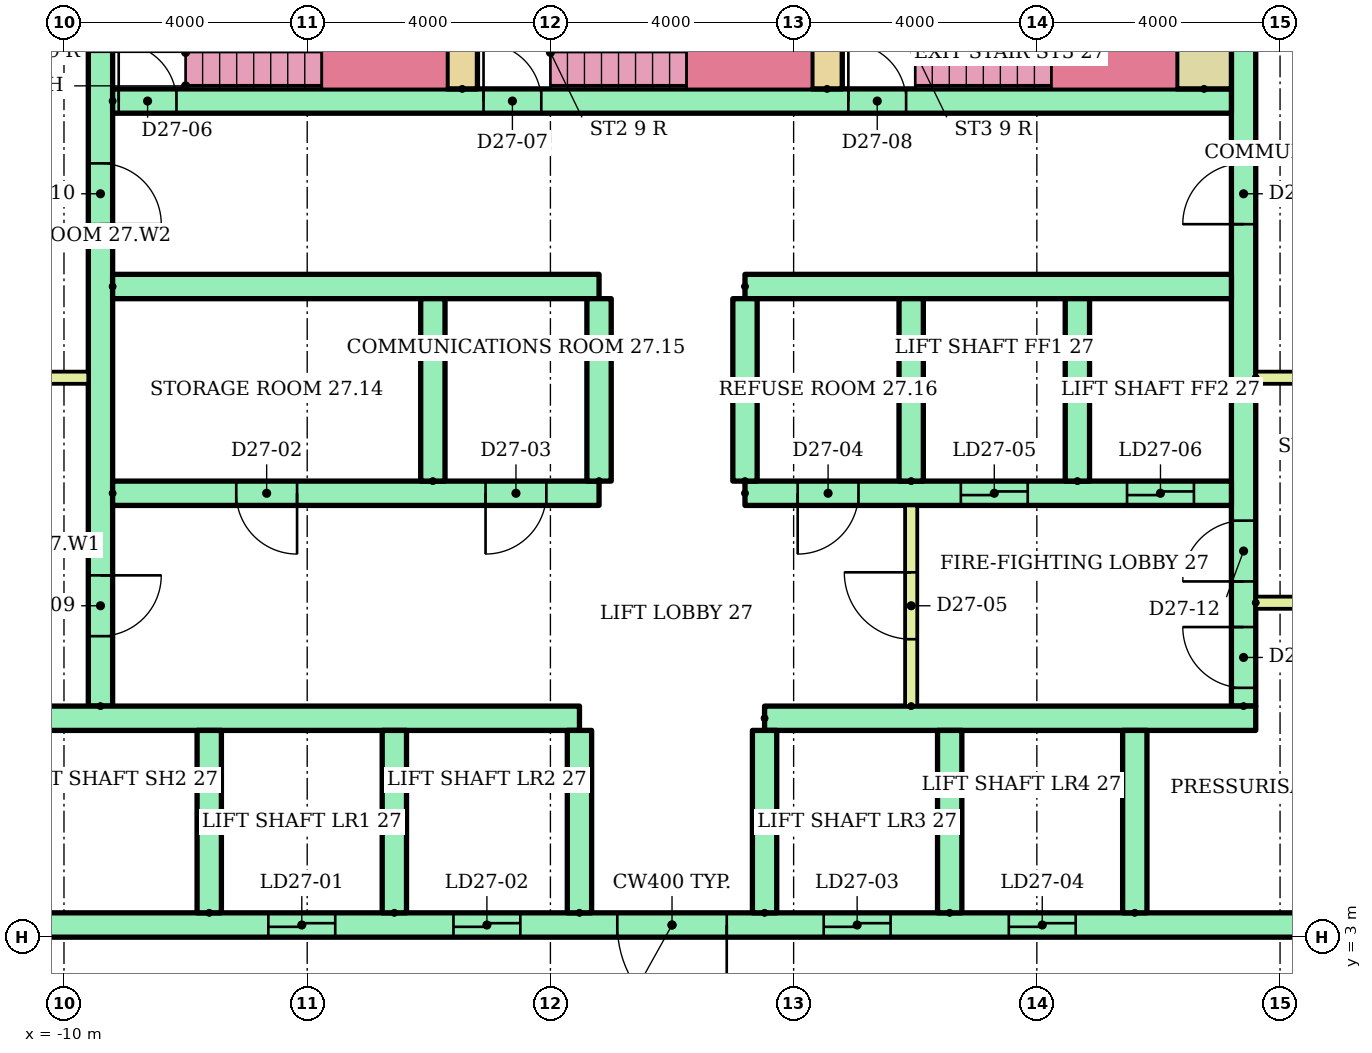
"""IFC4 building model, lengths in metres.
Left out: names, types, materials, properties, quantities, classifications, styles, units other than length and angle.
Written with IfcOpenShell. Run it as: python <this file> out.ifc"""

import sys

from ifc_helpers import new_model, si_unit, direction, frame, frame_2d, origin, place, context, subcontext, project, spatial, rectangle, extrude, element, fill, save


model = new_model("IFC4")
c1 = context("Model", 3, precision=1e-05, world=origin(), true_north=direction((0.0, 1.0)))
c2 = subcontext(c1, "Body", "Model", "MODEL_VIEW")
j1 = project(units=[si_unit("LENGTHUNIT", "METRE"), si_unit("PLANEANGLEUNIT", "RADIAN")], contexts=[c1])
p1 = place(None, origin())
s1 = spatial("IfcSite", under=j1, at=p1, CompositionType="ELEMENT")
p2 = place(p1, origin())
s2 = spatial("IfcBuilding", under=s1, at=p2, CompositionType="ELEMENT")
p3 = place(p2, frame((0.0, 0.0, 103.1)))
s3 = spatial("IfcBuildingStorey", under=s2, at=p3, CompositionType="ELEMENT", Elevation=103.1)
p4 = place(p3, frame((-9.4, 6.8, 0.0), z_axis=(0.0, 0.0, 1.0), x_axis=(0.0, 1.0, 0.0)))
e1 = element("IfcWall", 1, at=p4, inside=s3, PredefinedType="SHEAR", context=c2, shape_type="SweptSolid", body=[
    extrude(rectangle(XDim=12.7, YDim=0.4, at=frame_2d((6.35, 0.0))), origin(), (0.0, 0.0, 1.0), 2.8),
])
p5 = place(p4, frame((1.15, 0.0, 0.0)))
e2 = element("IfcOpeningElement", 2, at=p5, cuts=e1, PredefinedType="OPENING", context=c2, shape_type="SweptSolid", body=[
    extrude(rectangle(XDim=1.0, YDim=2.1, at=frame_2d((0.5, 1.05))), frame((0.0, 0.21, 0.0), z_axis=(0.0, -1.0, 0.0), x_axis=(1.0, 0.0, 0.0)), (0.0, 0.0, 1.0), 0.42),
])
p6 = place(p4, frame((7.925, 0.0, 0.0)))
e3 = element("IfcOpeningElement", 3, at=p6, cuts=e1, PredefinedType="OPENING", context=c2, shape_type="SweptSolid", body=[
    extrude(rectangle(XDim=1.0, YDim=2.1, at=frame_2d((0.5, 1.05))), frame((0.0, 0.21, 0.0), z_axis=(0.0, -1.0, 0.0), x_axis=(1.0, 0.0, 0.0)), (0.0, 0.0, 1.0), 0.42),
])
p7 = place(p3, frame((9.4, 6.8, 0.0), z_axis=(0.0, 0.0, 1.0), x_axis=(0.0, 1.0, 0.0)))
e4 = element("IfcWall", 4, at=p7, inside=s3, PredefinedType="SHEAR", context=c2, shape_type="SweptSolid", body=[
    extrude(rectangle(XDim=12.7, YDim=0.4, at=frame_2d((6.35, 0.0))), origin(), (0.0, 0.0, 1.0), 2.8),
])
p8 = place(p7, frame((0.3, 0.0, 0.0)))
e5 = element("IfcOpeningElement", 5, at=p8, cuts=e4, PredefinedType="OPENING", context=c2, shape_type="SweptSolid", body=[
    extrude(rectangle(XDim=1.0, YDim=2.1, at=frame_2d((0.5, 1.05))), frame((0.0, 0.21, 0.0), z_axis=(0.0, -1.0, 0.0), x_axis=(1.0, 0.0, 0.0)), (0.0, 0.0, 1.0), 0.42),
])
p9 = place(p7, frame((2.05, 0.0, 0.0)))
e6 = element("IfcOpeningElement", 6, at=p9, cuts=e4, PredefinedType="OPENING", context=c2, shape_type="SweptSolid", body=[
    extrude(rectangle(XDim=1.0, YDim=2.1, at=frame_2d((0.5, 1.05))), frame((0.0, 0.21, 0.0), z_axis=(0.0, -1.0, 0.0), x_axis=(1.0, 0.0, 0.0)), (0.0, 0.0, 1.0), 0.42),
])
p10 = place(p7, frame((7.925, 0.0, 0.0)))
e7 = element("IfcOpeningElement", 7, at=p10, cuts=e4, PredefinedType="OPENING", context=c2, shape_type="SweptSolid", body=[
    extrude(rectangle(XDim=1.0, YDim=2.1, at=frame_2d((0.5, 1.05))), frame((0.0, 0.21, 0.0), z_axis=(0.0, -1.0, 0.0), x_axis=(1.0, 0.0, 0.0)), (0.0, 0.0, 1.0), 0.42),
])
p11 = place(p3, frame((-13.5, 3.2, 0.0)))
e8 = element("IfcWall", 8, at=p11, inside=s3, PredefinedType="SHEAR", context=c2, shape_type="SweptSolid", body=[
    extrude(rectangle(XDim=27.0, YDim=0.4, at=frame_2d((13.5, 0.0))), origin(), (0.0, 0.0, 1.0), 2.8),
])
p12 = place(p11, frame((6.861, 0.0, 0.0)))
e9 = element("IfcOpeningElement", 9, at=p12, cuts=e8, PredefinedType="OPENING", context=c2, shape_type="SweptSolid", body=[
    extrude(rectangle(XDim=1.1, YDim=2.1, at=frame_2d((0.55, 1.05))), frame((0.0, 0.21, 0.0), z_axis=(0.0, -1.0, 0.0), x_axis=(1.0, 0.0, 0.0)), (0.0, 0.0, 1.0), 0.42),
])
p13 = place(p11, frame((9.906, 0.0, 0.0)))
e10 = element("IfcOpeningElement", 10, at=p13, cuts=e8, PredefinedType="OPENING", context=c2, shape_type="SweptSolid", body=[
    extrude(rectangle(XDim=1.1, YDim=2.1, at=frame_2d((0.55, 1.05))), frame((0.0, 0.21, 0.0), z_axis=(0.0, -1.0, 0.0), x_axis=(1.0, 0.0, 0.0)), (0.0, 0.0, 1.0), 0.42),
])
p14 = place(p11, frame((15.994, 0.0, 0.0)))
e11 = element("IfcOpeningElement", 11, at=p14, cuts=e8, PredefinedType="OPENING", context=c2, shape_type="SweptSolid", body=[
    extrude(rectangle(XDim=1.1, YDim=2.1, at=frame_2d((0.55, 1.05))), frame((0.0, 0.21, 0.0), z_axis=(0.0, -1.0, 0.0), x_axis=(1.0, 0.0, 0.0)), (0.0, 0.0, 1.0), 0.42),
])
p15 = place(p11, frame((19.039, 0.0, 0.0)))
e12 = element("IfcOpeningElement", 12, at=p15, cuts=e8, PredefinedType="OPENING", context=c2, shape_type="SweptSolid", body=[
    extrude(rectangle(XDim=1.1, YDim=2.1, at=frame_2d((0.55, 1.05))), frame((0.0, 0.21, 0.0), z_axis=(0.0, -1.0, 0.0), x_axis=(1.0, 0.0, 0.0)), (0.0, 0.0, 1.0), 0.42),
])
p16 = place(p11, frame((12.6, 0.0, 0.0)))
e13 = element("IfcOpeningElement", 13, at=p16, cuts=e8, PredefinedType="OPENING", context=c2, shape_type="SweptSolid", body=[
    extrude(rectangle(XDim=1.8, YDim=2.1, at=frame_2d((0.9, 1.05))), frame((0.0, 0.21, 0.0), z_axis=(0.0, -1.0, 0.0), x_axis=(1.0, 0.0, 0.0)), (0.0, 0.0, 1.0), 0.42),
])
p17 = place(p3, frame((-13.5, 6.6, 0.0)))
e14 = element("IfcWall", 14, at=p17, inside=s3, PredefinedType="SHEAR", context=c2, shape_type="SweptSolid", body=[
    extrude(rectangle(XDim=11.978, YDim=0.4, at=frame_2d((5.989, 0.0))), origin(), (0.0, 0.0, 1.0), 2.8),
])
p18 = place(p3, frame((1.522, 6.6, 0.0)))
e15 = element("IfcWall", 15, at=p18, inside=s3, PredefinedType="SHEAR", context=c2, shape_type="SweptSolid", body=[
    extrude(rectangle(XDim=8.078, YDim=0.4, at=frame_2d((4.039, 0.0))), origin(), (0.0, 0.0, 1.0), 2.8),
])
for number, where, z_axis, x_axis in (
    (16, (-7.611, 3.4, 0.0), (0.0, 0.0, 1.0), (0.0, 1.0, 0.0)),
    (17, (-4.567, 3.4, 0.0), (0.0, 0.0, 1.0), (0.0, 1.0, 0.0)),
    (18, (-1.522, 3.4, 0.0), (0.0, 0.0, 1.0), (0.0, 1.0, 0.0)),
    (19, (1.522, 3.4, 0.0), (0.0, 0.0, 1.0), (0.0, 1.0, 0.0)),
    (20, (4.567, 3.4, 0.0), (0.0, 0.0, 1.0), (0.0, 1.0, 0.0)),
    (21, (7.611, 3.4, 0.0), (0.0, 0.0, 1.0), (0.0, 1.0, 0.0)),
):
    element("IfcWall", number, at=place(p3, frame(where, z_axis=z_axis, x_axis=x_axis)), inside=s3, PredefinedType="SHEAR", context=c2, shape_type="SweptSolid", body=[
        extrude(rectangle(XDim=3.0, YDim=0.4, at=frame_2d((1.5, 0.0))), origin(), (0.0, 0.0, 1.0), 2.8),
    ])
p19 = place(p3, frame((-9.2, 10.3, 0.0)))
e22 = element("IfcWall", 22, at=p19, inside=s3, PredefinedType="SHEAR", context=c2, shape_type="SweptSolid", body=[
    extrude(rectangle(XDim=8.0, YDim=0.4, at=frame_2d((4.0, 0.0))), origin(), (0.0, 0.0, 1.0), 2.8),
])
p20 = place(p19, frame((2.033, 0.0, 0.0)))
e23 = element("IfcOpeningElement", 23, at=p20, cuts=e22, PredefinedType="OPENING", context=c2, shape_type="SweptSolid", body=[
    extrude(rectangle(XDim=1.0, YDim=2.1, at=frame_2d((0.5, 1.05))), frame((0.0, 0.21, 0.0), z_axis=(0.0, -1.0, 0.0), x_axis=(1.0, 0.0, 0.0)), (0.0, 0.0, 1.0), 0.42),
])
p21 = place(p19, frame((6.133, 0.0, 0.0)))
e24 = element("IfcOpeningElement", 24, at=p21, cuts=e22, PredefinedType="OPENING", context=c2, shape_type="SweptSolid", body=[
    extrude(rectangle(XDim=1.0, YDim=2.1, at=frame_2d((0.5, 1.05))), frame((0.0, 0.21, 0.0), z_axis=(0.0, -1.0, 0.0), x_axis=(1.0, 0.0, 0.0)), (0.0, 0.0, 1.0), 0.42),
])
p22 = place(p3, frame((-9.2, 13.7, 0.0)))
e25 = element("IfcWall", 25, at=p22, inside=s3, PredefinedType="SHEAR", context=c2, shape_type="SweptSolid", body=[
    extrude(rectangle(XDim=8.0, YDim=0.4, at=frame_2d((4.0, 0.0))), origin(), (0.0, 0.0, 1.0), 2.8),
])
p23 = place(p3, frame((1.2, 10.3, 0.0)))
e26 = element("IfcWall", 26, at=p23, inside=s3, PredefinedType="SHEAR", context=c2, shape_type="SweptSolid", body=[
    extrude(rectangle(XDim=8.0, YDim=0.4, at=frame_2d((4.0, 0.0))), origin(), (0.0, 0.0, 1.0), 2.8),
])
p24 = place(p23, frame((3.55, 0.0, 0.0)))
e27 = element("IfcOpeningElement", 27, at=p24, cuts=e26, PredefinedType="OPENING", context=c2, shape_type="SweptSolid", body=[
    extrude(rectangle(XDim=1.1, YDim=2.1, at=frame_2d((0.55, 1.05))), frame((0.0, 0.21, 0.0), z_axis=(0.0, -1.0, 0.0), x_axis=(1.0, 0.0, 0.0)), (0.0, 0.0, 1.0), 0.42),
])
p25 = place(p23, frame((6.283, 0.0, 0.0)))
e28 = element("IfcOpeningElement", 28, at=p25, cuts=e26, PredefinedType="OPENING", context=c2, shape_type="SweptSolid", body=[
    extrude(rectangle(XDim=1.1, YDim=2.1, at=frame_2d((0.55, 1.05))), frame((0.0, 0.21, 0.0), z_axis=(0.0, -1.0, 0.0), x_axis=(1.0, 0.0, 0.0)), (0.0, 0.0, 1.0), 0.42),
])
p26 = place(p23, frame((0.867, 0.0, 0.0)))
e29 = element("IfcOpeningElement", 29, at=p26, cuts=e26, PredefinedType="OPENING", context=c2, shape_type="SweptSolid", body=[
    extrude(rectangle(XDim=1.0, YDim=2.1, at=frame_2d((0.5, 1.05))), frame((0.0, 0.21, 0.0), z_axis=(0.0, -1.0, 0.0), x_axis=(1.0, 0.0, 0.0)), (0.0, 0.0, 1.0), 0.42),
])
p27 = place(p3, frame((1.2, 13.7, 0.0)))
e30 = element("IfcWall", 30, at=p27, inside=s3, PredefinedType="SHEAR", context=c2, shape_type="SweptSolid", body=[
    extrude(rectangle(XDim=8.0, YDim=0.4, at=frame_2d((4.0, 0.0))), origin(), (0.0, 0.0, 1.0), 2.8),
])
for number, where, z_axis, x_axis in (
    (31, (-3.933, 10.5, 0.0), (0.0, 0.0, 1.0), (0.0, 1.0, 0.0)),
    (32, (-1.2, 10.5, 0.0), (0.0, 0.0, 1.0), (0.0, 1.0, 0.0)),
    (33, (1.2, 10.5, 0.0), (0.0, 0.0, 1.0), (0.0, 1.0, 0.0)),
    (34, (3.933, 10.5, 0.0), (0.0, 0.0, 1.0), (0.0, 1.0, 0.0)),
    (35, (6.667, 10.5, 0.0), (0.0, 0.0, 1.0), (0.0, 1.0, 0.0)),
):
    element("IfcWall", number, at=place(p3, frame(where, z_axis=z_axis, x_axis=x_axis)), inside=s3, PredefinedType="SHEAR", context=c2, shape_type="SweptSolid", body=[
        extrude(rectangle(XDim=3.0, YDim=0.4, at=frame_2d((1.5, 0.0))), origin(), (0.0, 0.0, 1.0), 2.8),
    ])
p28 = place(p3, frame((3.933, 6.8, 0.0), z_axis=(0.0, 0.0, 1.0), x_axis=(0.0, 1.0, 0.0)))
e36 = element("IfcWall", 36, at=p28, inside=s3, PredefinedType="PARTITIONING", context=c2, shape_type="SweptSolid", body=[
    extrude(rectangle(XDim=3.3, YDim=0.2, at=frame_2d((1.65, 0.0))), origin(), (0.0, 0.0, 1.0), 2.8),
])
p29 = place(p28, frame((1.1, 0.0, 0.0)))
e37 = element("IfcOpeningElement", 37, at=p29, cuts=e36, PredefinedType="OPENING", context=c2, shape_type="SweptSolid", body=[
    extrude(rectangle(XDim=1.1, YDim=2.1, at=frame_2d((0.55, 1.05))), frame((0.0, 0.11, 0.0), z_axis=(0.0, -1.0, 0.0), x_axis=(1.0, 0.0, 0.0)), (0.0, 0.0, 1.0), 0.22),
])
p30 = place(p3, frame((-9.2, 16.75, 0.0)))
e38 = element("IfcWall", 38, at=p30, inside=s3, PredefinedType="SHEAR", context=c2, shape_type="SweptSolid", body=[
    extrude(rectangle(XDim=18.4, YDim=0.4, at=frame_2d((9.2, 0.0))), origin(), (0.0, 0.0, 1.0), 2.8),
])
p31 = place(p30, frame((0.1, 0.0, 0.0)))
e39 = element("IfcOpeningElement", 39, at=p31, cuts=e38, PredefinedType="OPENING", context=c2, shape_type="SweptSolid", body=[
    extrude(rectangle(XDim=0.95, YDim=2.1, at=frame_2d((0.475, 1.05))), frame((0.0, 0.21, 0.0), z_axis=(0.0, -1.0, 0.0), x_axis=(1.0, 0.0, 0.0)), (0.0, 0.0, 1.0), 0.42),
])
p32 = place(p30, frame((6.1, 0.0, 0.0)))
e40 = element("IfcOpeningElement", 40, at=p32, cuts=e38, PredefinedType="OPENING", context=c2, shape_type="SweptSolid", body=[
    extrude(rectangle(XDim=0.95, YDim=2.1, at=frame_2d((0.475, 1.05))), frame((0.0, 0.21, 0.0), z_axis=(0.0, -1.0, 0.0), x_axis=(1.0, 0.0, 0.0)), (0.0, 0.0, 1.0), 0.42),
])
p33 = place(p30, frame((12.1, 0.0, 0.0)))
e41 = element("IfcOpeningElement", 41, at=p33, cuts=e38, PredefinedType="OPENING", context=c2, shape_type="SweptSolid", body=[
    extrude(rectangle(XDim=0.95, YDim=2.1, at=frame_2d((0.475, 1.05))), frame((0.0, 0.21, 0.0), z_axis=(0.0, -1.0, 0.0), x_axis=(1.0, 0.0, 0.0)), (0.0, 0.0, 1.0), 0.42),
])
for number, where, z_axis, x_axis in (
    (42, (-3.45, 16.95, 0.0), (0.0, 0.0, 1.0), (0.0, 1.0, 0.0)),
    (43, (2.55, 16.95, 0.0), (0.0, 0.0, 1.0), (0.0, 1.0, 0.0)),
):
    element("IfcWall", number, at=place(p3, frame(where, z_axis=z_axis, x_axis=x_axis)), inside=s3, PredefinedType="SHEAR", context=c2, shape_type="SweptSolid", body=[
        extrude(rectangle(XDim=2.55, YDim=0.5, at=frame_2d((1.275, 0.0))), origin(), (0.0, 0.0, 1.0), 2.8),
    ])
p34 = place(p3, frame((8.75, 16.95, 0.0), z_axis=(0.0, 0.0, 1.0), x_axis=(0.0, 1.0, 0.0)))
e44 = element("IfcWall", 44, at=p34, inside=s3, PredefinedType="SHEAR", context=c2, shape_type="SweptSolid", body=[
    extrude(rectangle(XDim=2.55, YDim=0.9, at=frame_2d((1.275, 0.0))), origin(), (0.0, 0.0, 1.0), 2.8),
])
for number, where in (
    (45, (-13.5, 12.2, 0.0)),
    (46, (9.6, 8.5, 0.0)),
    (47, (9.6, 12.2, 0.0)),
):
    element("IfcWall", number, at=place(p3, frame(where)), inside=s3, PredefinedType="PARTITIONING", context=c2, shape_type="SweptSolid", body=[
        extrude(rectangle(XDim=3.9, YDim=0.2, at=frame_2d((1.95, 0.0))), origin(), (0.0, 0.0, 1.0), 2.8),
    ])
p35 = place(p12, origin())
e48 = element("IfcDoor", 48, at=p35, inside=s3, OperationType="SLIDING_TO_LEFT", PredefinedType="DOOR", context=c2, shape_type="SweptSolid", body=[
    extrude(rectangle(XDim=1.1, YDim=2.1, at=frame_2d((0.55, 1.05))), frame((0.0, 0.025, 0.0), z_axis=(0.0, -1.0, 0.0), x_axis=(1.0, 0.0, 0.0)), (0.0, 0.0, 1.0), 0.05),
])
fill(e9, e48)
p36 = place(p13, origin())
e49 = element("IfcDoor", 49, at=p36, inside=s3, OperationType="SLIDING_TO_LEFT", PredefinedType="DOOR", context=c2, shape_type="SweptSolid", body=[
    extrude(rectangle(XDim=1.1, YDim=2.1, at=frame_2d((0.55, 1.05))), frame((0.0, 0.025, 0.0), z_axis=(0.0, -1.0, 0.0), x_axis=(1.0, 0.0, 0.0)), (0.0, 0.0, 1.0), 0.05),
])
fill(e10, e49)
p37 = place(p14, origin())
e50 = element("IfcDoor", 50, at=p37, inside=s3, OperationType="SLIDING_TO_LEFT", PredefinedType="DOOR", context=c2, shape_type="SweptSolid", body=[
    extrude(rectangle(XDim=1.1, YDim=2.1, at=frame_2d((0.55, 1.05))), frame((0.0, 0.025, 0.0), z_axis=(0.0, -1.0, 0.0), x_axis=(1.0, 0.0, 0.0)), (0.0, 0.0, 1.0), 0.05),
])
fill(e11, e50)
p38 = place(p15, origin())
e51 = element("IfcDoor", 51, at=p38, inside=s3, OperationType="SLIDING_TO_LEFT", PredefinedType="DOOR", context=c2, shape_type="SweptSolid", body=[
    extrude(rectangle(XDim=1.1, YDim=2.1, at=frame_2d((0.55, 1.05))), frame((0.0, 0.025, 0.0), z_axis=(0.0, -1.0, 0.0), x_axis=(1.0, 0.0, 0.0)), (0.0, 0.0, 1.0), 0.05),
])
fill(e12, e51)
p39 = place(p16, frame((1.8, 0.0, 0.0), z_axis=(0.0, 0.0, 1.0), x_axis=(-1.0, 0.0, 0.0)))
e52 = element("IfcDoor", 52, at=p39, inside=s3, OperationType="DOUBLE_DOOR_SINGLE_SWING", PredefinedType="DOOR", context=c2, shape_type="SweptSolid", body=[
    extrude(rectangle(XDim=1.8, YDim=2.1, at=frame_2d((0.9, 1.05))), frame((0.0, 0.025, 0.0), z_axis=(0.0, -1.0, 0.0), x_axis=(1.0, 0.0, 0.0)), (0.0, 0.0, 1.0), 0.05),
])
fill(e13, e52)
p40 = place(p24, origin())
e53 = element("IfcDoor", 53, at=p40, inside=s3, OperationType="SLIDING_TO_LEFT", PredefinedType="DOOR", context=c2, shape_type="SweptSolid", body=[
    extrude(rectangle(XDim=1.1, YDim=2.1, at=frame_2d((0.55, 1.05))), frame((0.0, 0.025, 0.0), z_axis=(0.0, -1.0, 0.0), x_axis=(1.0, 0.0, 0.0)), (0.0, 0.0, 1.0), 0.05),
])
fill(e27, e53)
p41 = place(p25, origin())
e54 = element("IfcDoor", 54, at=p41, inside=s3, OperationType="SLIDING_TO_LEFT", PredefinedType="DOOR", context=c2, shape_type="SweptSolid", body=[
    extrude(rectangle(XDim=1.1, YDim=2.1, at=frame_2d((0.55, 1.05))), frame((0.0, 0.025, 0.0), z_axis=(0.0, -1.0, 0.0), x_axis=(1.0, 0.0, 0.0)), (0.0, 0.0, 1.0), 0.05),
])
fill(e28, e54)
p42 = place(p20, frame((1.0, 0.0, 0.0), z_axis=(0.0, 0.0, 1.0), x_axis=(-1.0, 0.0, 0.0)))
e55 = element("IfcDoor", 55, at=p42, inside=s3, OperationType="SINGLE_SWING_RIGHT", PredefinedType="DOOR", context=c2, shape_type="SweptSolid", body=[
    extrude(rectangle(XDim=1.0, YDim=2.1, at=frame_2d((0.5, 1.05))), frame((0.0, 0.025, 0.0), z_axis=(0.0, -1.0, 0.0), x_axis=(1.0, 0.0, 0.0)), (0.0, 0.0, 1.0), 0.05),
])
fill(e23, e55)
p43 = place(p21, frame((1.0, 0.0, 0.0), z_axis=(0.0, 0.0, 1.0), x_axis=(-1.0, 0.0, 0.0)))
e56 = element("IfcDoor", 56, at=p43, inside=s3, OperationType="SINGLE_SWING_LEFT", PredefinedType="DOOR", context=c2, shape_type="SweptSolid", body=[
    extrude(rectangle(XDim=1.0, YDim=2.1, at=frame_2d((0.5, 1.05))), frame((0.0, 0.025, 0.0), z_axis=(0.0, -1.0, 0.0), x_axis=(1.0, 0.0, 0.0)), (0.0, 0.0, 1.0), 0.05),
])
fill(e24, e56)
p44 = place(p26, frame((1.0, 0.0, 0.0), z_axis=(0.0, 0.0, 1.0), x_axis=(-1.0, 0.0, 0.0)))
e57 = element("IfcDoor", 57, at=p44, inside=s3, OperationType="SINGLE_SWING_LEFT", PredefinedType="DOOR", context=c2, shape_type="SweptSolid", body=[
    extrude(rectangle(XDim=1.0, YDim=2.1, at=frame_2d((0.5, 1.05))), frame((0.0, 0.025, 0.0), z_axis=(0.0, -1.0, 0.0), x_axis=(1.0, 0.0, 0.0)), (0.0, 0.0, 1.0), 0.05),
])
fill(e29, e57)
p45 = place(p29, origin())
e58 = element("IfcDoor", 58, at=p45, inside=s3, OperationType="SINGLE_SWING_RIGHT", PredefinedType="DOOR", context=c2, shape_type="SweptSolid", body=[
    extrude(rectangle(XDim=1.1, YDim=2.1, at=frame_2d((0.55, 1.05))), frame((0.0, 0.025, 0.0), z_axis=(0.0, -1.0, 0.0), x_axis=(1.0, 0.0, 0.0)), (0.0, 0.0, 1.0), 0.05),
])
fill(e37, e58)
p46 = place(p31, origin())
e59 = element("IfcDoor", 59, at=p46, inside=s3, OperationType="SINGLE_SWING_LEFT", PredefinedType="DOOR", context=c2, shape_type="SweptSolid", body=[
    extrude(rectangle(XDim=0.95, YDim=2.1, at=frame_2d((0.475, 1.05))), frame((0.0, 0.025, 0.0), z_axis=(0.0, -1.0, 0.0), x_axis=(1.0, 0.0, 0.0)), (0.0, 0.0, 1.0), 0.05),
])
fill(e39, e59)
p47 = place(p32, origin())
e60 = element("IfcDoor", 60, at=p47, inside=s3, OperationType="SINGLE_SWING_LEFT", PredefinedType="DOOR", context=c2, shape_type="SweptSolid", body=[
    extrude(rectangle(XDim=0.95, YDim=2.1, at=frame_2d((0.475, 1.05))), frame((0.0, 0.025, 0.0), z_axis=(0.0, -1.0, 0.0), x_axis=(1.0, 0.0, 0.0)), (0.0, 0.0, 1.0), 0.05),
])
fill(e40, e60)
p48 = place(p33, origin())
e61 = element("IfcDoor", 61, at=p48, inside=s3, OperationType="SINGLE_SWING_LEFT", PredefinedType="DOOR", context=c2, shape_type="SweptSolid", body=[
    extrude(rectangle(XDim=0.95, YDim=2.1, at=frame_2d((0.475, 1.05))), frame((0.0, 0.025, 0.0), z_axis=(0.0, -1.0, 0.0), x_axis=(1.0, 0.0, 0.0)), (0.0, 0.0, 1.0), 0.05),
])
fill(e41, e61)
p49 = place(p5, frame((1.0, 0.0, 0.0), z_axis=(0.0, 0.0, 1.0), x_axis=(-1.0, 0.0, 0.0)))
e62 = element("IfcDoor", 62, at=p49, inside=s3, OperationType="SINGLE_SWING_RIGHT", PredefinedType="DOOR", context=c2, shape_type="SweptSolid", body=[
    extrude(rectangle(XDim=1.0, YDim=2.1, at=frame_2d((0.5, 1.05))), frame((0.0, 0.025, 0.0), z_axis=(0.0, -1.0, 0.0), x_axis=(1.0, 0.0, 0.0)), (0.0, 0.0, 1.0), 0.05),
])
fill(e2, e62)
p50 = place(p6, frame((1.0, 0.0, 0.0), z_axis=(0.0, 0.0, 1.0), x_axis=(-1.0, 0.0, 0.0)))
e63 = element("IfcDoor", 63, at=p50, inside=s3, OperationType="SINGLE_SWING_LEFT", PredefinedType="DOOR", context=c2, shape_type="SweptSolid", body=[
    extrude(rectangle(XDim=1.0, YDim=2.1, at=frame_2d((0.5, 1.05))), frame((0.0, 0.025, 0.0), z_axis=(0.0, -1.0, 0.0), x_axis=(1.0, 0.0, 0.0)), (0.0, 0.0, 1.0), 0.05),
])
fill(e3, e63)
p51 = place(p8, origin())
e64 = element("IfcDoor", 64, at=p51, inside=s3, OperationType="SINGLE_SWING_RIGHT", PredefinedType="DOOR", context=c2, shape_type="SweptSolid", body=[
    extrude(rectangle(XDim=1.0, YDim=2.1, at=frame_2d((0.5, 1.05))), frame((0.0, 0.025, 0.0), z_axis=(0.0, -1.0, 0.0), x_axis=(1.0, 0.0, 0.0)), (0.0, 0.0, 1.0), 0.05),
])
fill(e5, e64)
p52 = place(p9, origin())
e65 = element("IfcDoor", 65, at=p52, inside=s3, OperationType="SINGLE_SWING_LEFT", PredefinedType="DOOR", context=c2, shape_type="SweptSolid", body=[
    extrude(rectangle(XDim=1.0, YDim=2.1, at=frame_2d((0.5, 1.05))), frame((0.0, 0.025, 0.0), z_axis=(0.0, -1.0, 0.0), x_axis=(1.0, 0.0, 0.0)), (0.0, 0.0, 1.0), 0.05),
])
fill(e6, e65)
p53 = place(p10, origin())
e66 = element("IfcDoor", 66, at=p53, inside=s3, OperationType="SINGLE_SWING_LEFT", PredefinedType="DOOR", context=c2, shape_type="SweptSolid", body=[
    extrude(rectangle(XDim=1.0, YDim=2.1, at=frame_2d((0.5, 1.05))), frame((0.0, 0.025, 0.0), z_axis=(0.0, -1.0, 0.0), x_axis=(1.0, 0.0, 0.0)), (0.0, 0.0, 1.0), 0.05),
])
fill(e7, e66)
save(model, sys.argv[1])
